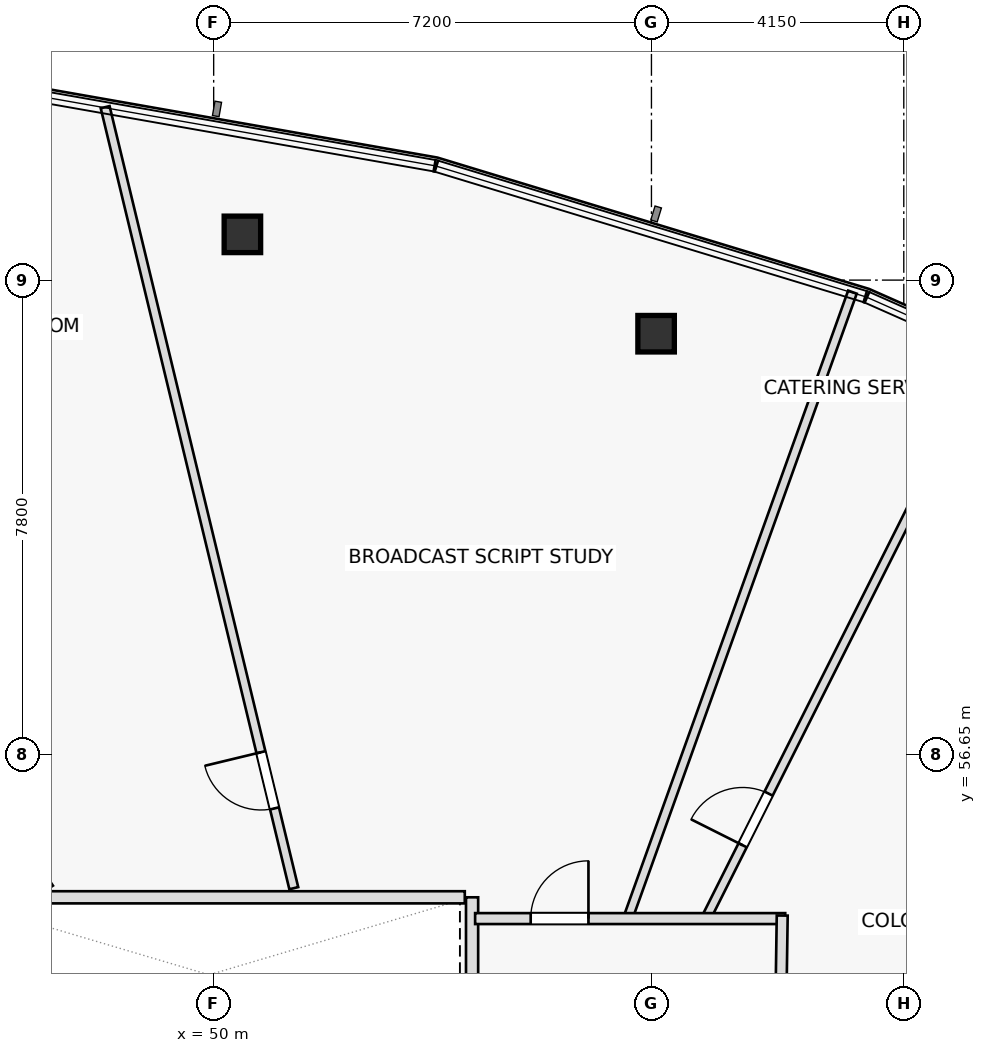
"""IFC4 building model, lengths in metres.
Left out: names, types, materials, properties, quantities, classifications, styles, units other than length and angle.
Written with IfcOpenShell. Run it as: python <this file> out.ifc"""

import sys

from ifc_helpers import new_model, si_unit, direction, frame, frame_2d, origin, origin_2d, place, context, subcontext, project, spatial, rectangle, hollow_rectangle, extrude, element, fill, save


model = new_model("IFC4")
c1 = context("Model", 3, precision=1e-05, world=origin(), true_north=direction((0.0, 1.0)))
c2 = subcontext(c1, "Body", "Model", "MODEL_VIEW")
j1 = project(units=[si_unit("LENGTHUNIT", "METRE"), si_unit("PLANEANGLEUNIT", "RADIAN")], contexts=[c1])
p1 = place(None, origin())
s1 = spatial("IfcSite", under=j1, at=p1, CompositionType="ELEMENT")
p2 = place(p1, origin())
s2 = spatial("IfcBuilding", under=s1, at=p2, CompositionType="ELEMENT")
p3 = place(p2, frame((0.0, 0.0, 200.3)))
s3 = spatial("IfcBuildingStorey", under=s2, at=p3, CompositionType="ELEMENT", Elevation=200.3)
for number, where, z_axis, x_axis in (
    (1, (57.277, 63.568, 0.0), (0.0, 0.0, 1.0), (1.0, 0.0, 0.0)),
    (2, (50.472, 65.202, 0.0), (0.0, 0.0, 1.0), (1.0, 0.0, 0.0)),
):
    element("IfcColumn", number, at=place(p3, frame(where, z_axis=z_axis, x_axis=x_axis)), inside=s3, PredefinedType="COLUMN", context=c2, shape_type="SweptSolid", body=[
        extrude(hollow_rectangle(XDim=0.6, YDim=0.6, WallThickness=0.036, at=origin_2d()), origin(), (0.0, 0.0, 1.0), 3.55),
    ])
p4 = place(p3, frame((54.25, 51.7, 0.0), z_axis=(0.0, 0.0, 1.0), x_axis=(0.0, 1.0, 0.0)))
e3 = element("IfcWall", 3, at=p4, inside=s3, PredefinedType="PARTITIONING", context=c2, shape_type="SweptSolid", body=[
    extrude(rectangle(XDim=2.6, YDim=0.2, at=frame_2d((1.3, 0.0))), origin(), (0.0, 0.0, 1.0), 3.55),
])
p5 = place(p3, frame((59.563, 48.25, 0.0), z_axis=(0.0, 0.0, 1.0), x_axis=(0.87805113136, 0.478566829938, 0.0)))
e4 = element("IfcWall", 4, at=p5, inside=s3, PredefinedType="PARTITIONING", context=c2, shape_type="SweptSolid", body=[
    extrude(rectangle(XDim=17.449, YDim=0.15, at=frame_2d((8.724, 0.0))), origin(), (0.0, 0.0, 1.0), 2.935),
])
p6 = place(p5, frame((1.35, 0.0, 0.0)))
e5 = element("IfcOpeningElement", 5, at=p6, cuts=e4, PredefinedType="OPENING", context=c2, shape_type="SweptSolid", body=[
    extrude(rectangle(XDim=0.95, YDim=2.05, at=frame_2d((0.475, 1.025))), frame((0.0, 0.085, 0.0), z_axis=(0.0, -1.0, 0.0), x_axis=(1.0, 0.0, 0.0)), (0.0, 0.0, 1.0), 0.17),
])
p7 = place(p3, frame((58.094, 53.95, 0.0), z_axis=(0.0, 0.0, 1.0), x_axis=(0.448756656044, 0.89365399549, 0.0)))
e6 = element("IfcWall", 6, at=p7, inside=s3, PredefinedType="PARTITIONING", context=c2, shape_type="SweptSolid", body=[
    extrude(rectangle(XDim=10.438, YDim=0.15, at=frame_2d((5.219, 0.0))), origin(), (0.0, 0.0, 1.0), 3.025),
])
p8 = place(p7, frame((1.35, 0.0, 0.0)))
e7 = element("IfcOpeningElement", 7, at=p8, cuts=e6, PredefinedType="OPENING", context=c2, shape_type="SweptSolid", body=[
    extrude(rectangle(XDim=0.95, YDim=2.05, at=frame_2d((0.475, 1.025))), frame((0.0, 0.085, 0.0), z_axis=(0.0, -1.0, 0.0), x_axis=(1.0, 0.0, 0.0)), (0.0, 0.0, 1.0), 0.17),
])
p9 = place(p3, frame((56.81, 53.95, 0.0), z_axis=(0.0, 0.0, 1.0), x_axis=(0.337627623522, 0.941279760663, 0.0)))
e8 = element("IfcWall", 8, at=p9, inside=s3, PredefinedType="PARTITIONING", context=c2, shape_type="SweptSolid", body=[
    extrude(rectangle(XDim=10.945, YDim=0.15, at=frame_2d((5.472, 0.0))), origin(), (0.0, 0.0, 1.0), 2.935),
])
p10 = place(p3, frame((51.318, 54.45, 0.0), z_axis=(0.0, 0.0, 1.0), x_axis=(-0.234780806693, 0.97204833872, 0.0)))
e9 = element("IfcWall", 9, at=p10, inside=s3, PredefinedType="PARTITIONING", context=c2, shape_type="SweptSolid", body=[
    extrude(rectangle(XDim=13.214, YDim=0.15, at=frame_2d((6.607, 0.0))), origin(), (0.0, 0.0, 1.0), 3.025),
])
p11 = place(p10, frame((1.35, 0.0, 0.0)))
e10 = element("IfcOpeningElement", 10, at=p11, cuts=e9, PredefinedType="OPENING", context=c2, shape_type="SweptSolid", body=[
    extrude(rectangle(XDim=0.95, YDim=2.05, at=frame_2d((0.475, 1.025))), frame((0.0, 0.085, 0.0), z_axis=(0.0, -1.0, 0.0), x_axis=(1.0, 0.0, 0.0)), (0.0, 0.0, 1.0), 0.17),
])
p12 = place(p3, frame((47.294, 54.45, 0.0), z_axis=(0.0, 0.0, 1.0), x_axis=(-0.55503631466, 0.831826117292, 0.0)))
e11 = element("IfcWall", 11, at=p12, inside=s3, PredefinedType="PARTITIONING", context=c2, shape_type="SweptSolid", body=[
    extrude(rectangle(XDim=16.257, YDim=0.15, at=frame_2d((8.128, 0.0))), origin(), (0.0, 0.0, 1.0), 2.935),
])
p13 = place(p3, frame((54.3, 53.95, 0.0), z_axis=(0.0, 0.0, 1.0), x_axis=(1.0, 0.0, 0.0)))
e12 = element("IfcWall", 12, at=p13, inside=s3, PredefinedType="PARTITIONING", context=c2, shape_type="SweptSolid", body=[
    extrude(rectangle(XDim=5.1, YDim=0.18, at=frame_2d((2.55, 0.0))), origin(), (0.0, 0.0, 1.0), 2.935),
])
p14 = place(p13, frame((0.914, 0.0, 0.0)))
e13 = element("IfcOpeningElement", 13, at=p14, cuts=e12, PredefinedType="OPENING", context=c2, shape_type="SweptSolid", body=[
    extrude(rectangle(XDim=0.95, YDim=2.05, at=frame_2d((0.475, 1.025))), frame((0.0, 0.1, 0.0), z_axis=(0.0, -1.0, 0.0), x_axis=(1.0, 0.0, 0.0)), (0.0, 0.0, 1.0), 0.2),
])
p15 = place(p3, frame((59.351, 54.0, 0.0), z_axis=(0.0, 0.0, 1.0), x_axis=(-0.014903899768, -0.999888930718, 0.0)))
e14 = element("IfcWall", 14, at=p15, inside=s3, PredefinedType="PARTITIONING", context=c2, shape_type="SweptSolid", body=[
    extrude(rectangle(XDim=5.701, YDim=0.18, at=frame_2d((2.85, 0.0))), origin(), (0.0, 0.0, 1.0), 2.935),
])
p16 = place(p15, frame((2.375, 0.0, 0.0)))
e15 = element("IfcOpeningElement", 15, at=p16, cuts=e14, PredefinedType="OPENING", context=c2, shape_type="SweptSolid", body=[
    extrude(rectangle(XDim=0.95, YDim=2.05, at=frame_2d((0.475, 1.025))), frame((0.0, 0.1, 0.0), z_axis=(0.0, -1.0, 0.0), x_axis=(1.0, 0.0, 0.0)), (0.0, 0.0, 1.0), 0.2),
])
p17 = place(p3, frame((45.82, 54.3, 0.0), z_axis=(0.0, 0.0, 1.0), x_axis=(1.0, 0.0, 0.0)))
e16 = element("IfcWall", 16, at=p17, inside=s3, PredefinedType="PARTITIONING", context=c2, shape_type="SweptSolid", body=[
    extrude(rectangle(XDim=8.31, YDim=0.2, at=frame_2d((4.155, 0.0))), origin(), (0.0, 0.0, 1.0), 3.55),
])
p18 = place(p8, origin())
e17 = element("IfcDoor", 17, at=p18, inside=s3, OperationType="SINGLE_SWING_LEFT", PredefinedType="DOOR", context=c2, shape_type="SweptSolid", body=[
    extrude(rectangle(XDim=0.95, YDim=2.05, at=frame_2d((0.475, 1.025))), frame((0.0, 0.025, 0.0), z_axis=(0.0, -1.0, 0.0), x_axis=(1.0, 0.0, 0.0)), (0.0, 0.0, 1.0), 0.05),
])
fill(e7, e17)
p19 = place(p11, origin())
e18 = element("IfcDoor", 18, at=p19, inside=s3, OperationType="SINGLE_SWING_RIGHT", PredefinedType="DOOR", context=c2, shape_type="SweptSolid", body=[
    extrude(rectangle(XDim=0.95, YDim=2.05, at=frame_2d((0.475, 1.025))), frame((0.0, 0.025, 0.0), z_axis=(0.0, -1.0, 0.0), x_axis=(1.0, 0.0, 0.0)), (0.0, 0.0, 1.0), 0.05),
])
fill(e10, e18)
p20 = place(p14, origin())
e19 = element("IfcDoor", 19, at=p20, inside=s3, OperationType="SINGLE_SWING_RIGHT", PredefinedType="DOOR", context=c2, shape_type="SweptSolid", body=[
    extrude(rectangle(XDim=0.95, YDim=2.05, at=frame_2d((0.475, 1.025))), frame((0.0, 0.025, 0.0), z_axis=(0.0, -1.0, 0.0), x_axis=(1.0, 0.0, 0.0)), (0.0, 0.0, 1.0), 0.05),
])
fill(e13, e19)
save(model, sys.argv[1])
